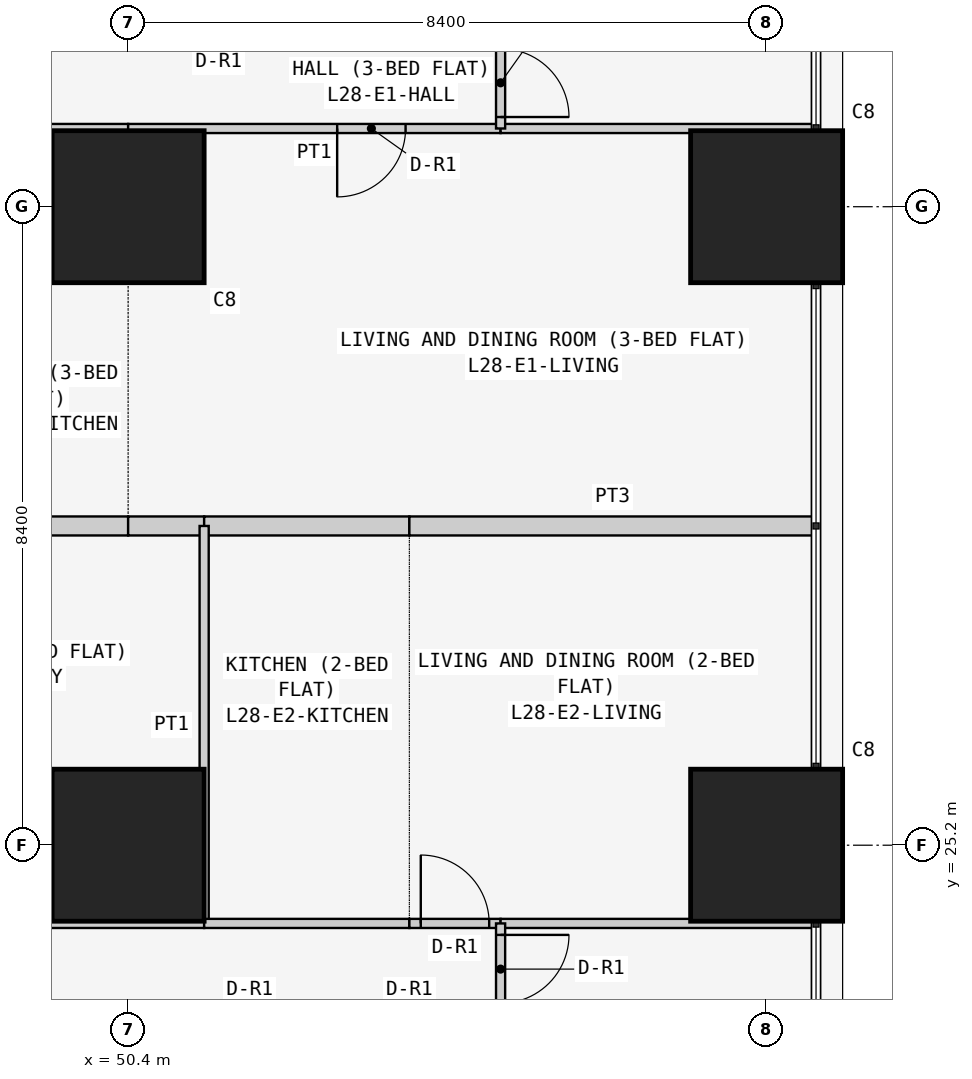
"""IFC4 building model, lengths in metres.
Left out: names, types, materials, properties, quantities, classifications, styles, units other than length and angle.
Written with IfcOpenShell. Run it as: python <this file> out.ifc"""

import sys

from ifc_helpers import new_model, si_unit, direction, frame, frame_2d, origin, origin_2d, place, context, subcontext, project, spatial, rectangle, extrude, element, fill, save


model = new_model("IFC4")
c1 = context("Model", 3, precision=1e-05, world=origin(), true_north=direction((0.0, 1.0)))
c2 = subcontext(c1, "Body", "Model", "MODEL_VIEW")
j1 = project(units=[si_unit("LENGTHUNIT", "METRE"), si_unit("PLANEANGLEUNIT", "RADIAN")], contexts=[c1])
p1 = place(None, origin())
s1 = spatial("IfcSite", under=j1, at=p1, CompositionType="ELEMENT")
p2 = place(p1, origin())
s2 = spatial("IfcBuilding", under=s1, at=p2, CompositionType="ELEMENT")
p3 = place(p2, frame((0.0, 0.0, 112.5)))
s3 = spatial("IfcBuildingStorey", under=s2, at=p3, CompositionType="ELEMENT", Elevation=112.5)
for number, where, z_axis, x_axis in (
    (1, (50.4, 25.2, 0.0), (0.0, 0.0, 1.0), (1.0, 0.0, 0.0)),
    (2, (50.4, 33.6, 0.0), (0.0, 0.0, 1.0), (1.0, 0.0, 0.0)),
    (3, (58.8, 25.2, 0.0), (0.0, 0.0, 1.0), (1.0, 0.0, 0.0)),
    (4, (58.8, 33.6, 0.0), (0.0, 0.0, 1.0), (1.0, 0.0, 0.0)),
):
    element("IfcColumn", number, at=place(p3, frame(where, z_axis=z_axis, x_axis=x_axis)), inside=s3, PredefinedType="COLUMN", context=c2, shape_type="SweptSolid", body=[
        extrude(rectangle(XDim=2.0, YDim=2.0, at=origin_2d()), origin(), (0.0, 0.0, 1.0), 3.6),
    ])
p4 = place(p3, frame((50.4, 34.629, 0.0), z_axis=(0.0, 0.0, 1.0), x_axis=(-1.0, 0.0, 0.0)))
e5 = element("IfcWall", 5, at=p4, inside=s3, PredefinedType="PARTITIONING", context=c2, shape_type="SweptSolid", body=[
    extrude(rectangle(XDim=2.4, YDim=0.12, at=frame_2d((1.2, 0.0))), origin(), (0.0, 0.0, 1.0), 3.45),
])
p5 = place(p3, frame((48.0, 29.4, 0.0), z_axis=(0.0, 0.0, 1.0), x_axis=(1.0, 0.0, 0.0)))
e6 = element("IfcWall", 6, at=p5, inside=s3, PredefinedType="PARTITIONING", context=c2, shape_type="SweptSolid", body=[
    extrude(rectangle(XDim=2.4, YDim=0.25, at=frame_2d((1.2, 0.0))), origin(), (0.0, 0.0, 1.0), 3.45),
])
p6 = place(p3, frame((55.3, 34.629, 0.0), z_axis=(0.0, 0.0, 1.0), x_axis=(-1.0, 0.0, 0.0)))
e7 = element("IfcWall", 7, at=p6, inside=s3, PredefinedType="PARTITIONING", context=c2, shape_type="SweptSolid", body=[
    extrude(rectangle(XDim=4.9, YDim=0.12, at=frame_2d((2.45, 0.0))), origin(), (0.0, 0.0, 1.0), 3.45),
])
p7 = place(p6, frame((1.25, 0.0, 0.0)))
e8 = element("IfcOpeningElement", 8, at=p7, cuts=e7, PredefinedType="OPENING", context=c2, shape_type="SweptSolid", body=[
    extrude(rectangle(XDim=0.9, YDim=2.1, at=frame_2d((0.45, 1.05))), frame((0.0, 0.07, 0.0), z_axis=(0.0, -1.0, 0.0), x_axis=(1.0, 0.0, 0.0)), (0.0, 0.0, 1.0), 0.14),
])
p8 = place(p3, frame((59.45, 34.629, 0.0), z_axis=(0.0, 0.0, 1.0), x_axis=(-1.0, 0.0, 0.0)))
e9 = element("IfcWall", 9, at=p8, inside=s3, PredefinedType="PARTITIONING", context=c2, shape_type="SweptSolid", body=[
    extrude(rectangle(XDim=4.15, YDim=0.12, at=frame_2d((2.075, 0.0))), origin(), (0.0, 0.0, 1.0), 3.45),
])
p9 = place(p3, frame((50.4, 29.4, 0.0), z_axis=(0.0, 0.0, 1.0), x_axis=(1.0, 0.0, 0.0)))
e10 = element("IfcWall", 10, at=p9, inside=s3, PredefinedType="PARTITIONING", context=c2, shape_type="SweptSolid", body=[
    extrude(rectangle(XDim=1.0, YDim=0.25, at=frame_2d((0.5, 0.0))), origin(), (0.0, 0.0, 1.0), 3.45),
])
p10 = place(p3, frame((51.4, 29.4, 0.0), z_axis=(0.0, 0.0, 1.0), x_axis=(1.0, 0.0, 0.0)))
e11 = element("IfcWall", 11, at=p10, inside=s3, PredefinedType="PARTITIONING", context=c2, shape_type="SweptSolid", body=[
    extrude(rectangle(XDim=2.7, YDim=0.25, at=frame_2d((1.35, 0.0))), origin(), (0.0, 0.0, 1.0), 3.45),
])
p11 = place(p3, frame((54.1, 29.4, 0.0), z_axis=(0.0, 0.0, 1.0), x_axis=(1.0, 0.0, 0.0)))
e12 = element("IfcWall", 12, at=p11, inside=s3, PredefinedType="PARTITIONING", context=c2, shape_type="SweptSolid", body=[
    extrude(rectangle(XDim=5.35, YDim=0.25, at=frame_2d((2.675, 0.0))), origin(), (0.0, 0.0, 1.0), 3.45),
])
p12 = place(p3, frame((55.3, 34.629, 0.0), z_axis=(0.0, 0.0, 1.0), x_axis=(0.0, 1.0, 0.0)))
e13 = element("IfcWall", 13, at=p12, inside=s3, PredefinedType="PARTITIONING", context=c2, shape_type="SweptSolid", body=[
    extrude(rectangle(XDim=1.2, YDim=0.12, at=frame_2d((0.6, 0.0))), origin(), (0.0, 0.0, 1.0), 3.45),
])
p13 = place(p12, frame((0.151, 0.0, 0.0)))
e14 = element("IfcOpeningElement", 14, at=p13, cuts=e13, PredefinedType="OPENING", context=c2, shape_type="SweptSolid", body=[
    extrude(rectangle(XDim=0.9, YDim=2.1, at=frame_2d((0.45, 1.05))), frame((0.0, 0.07, 0.0), z_axis=(0.0, -1.0, 0.0), x_axis=(1.0, 0.0, 0.0)), (0.0, 0.0, 1.0), 0.14),
])
p14 = place(p3, frame((51.4, 29.4, 0.0), z_axis=(0.0, 0.0, 1.0), x_axis=(0.0, -1.0, 0.0)))
e15 = element("IfcWall", 15, at=p14, inside=s3, PredefinedType="PARTITIONING", context=c2, shape_type="SweptSolid", body=[
    extrude(rectangle(XDim=5.229, YDim=0.12, at=frame_2d((2.615, 0.0))), origin(), (0.0, 0.0, 1.0), 3.45),
])
p15 = place(p3, frame((51.4, 24.171, 0.0), z_axis=(0.0, 0.0, 1.0), x_axis=(-1.0, 0.0, 0.0)))
e16 = element("IfcWall", 16, at=p15, inside=s3, PredefinedType="PARTITIONING", context=c2, shape_type="SweptSolid", body=[
    extrude(rectangle(XDim=4.8, YDim=0.12, at=frame_2d((2.4, 0.0))), origin(), (0.0, 0.0, 1.0), 3.45),
])
p16 = place(p15, frame((2.85, 0.0, 0.0)))
e17 = element("IfcOpeningElement", 17, at=p16, cuts=e16, PredefinedType="OPENING", context=c2, shape_type="SweptSolid", body=[
    extrude(rectangle(XDim=0.9, YDim=2.1, at=frame_2d((0.45, 1.05))), frame((0.0, 0.07, 0.0), z_axis=(0.0, -1.0, 0.0), x_axis=(1.0, 0.0, 0.0)), (0.0, 0.0, 1.0), 0.14),
])
p17 = place(p3, frame((54.1, 24.171, 0.0), z_axis=(0.0, 0.0, 1.0), x_axis=(-1.0, 0.0, 0.0)))
e18 = element("IfcWall", 18, at=p17, inside=s3, PredefinedType="PARTITIONING", context=c2, shape_type="SweptSolid", body=[
    extrude(rectangle(XDim=2.7, YDim=0.12, at=frame_2d((1.35, 0.0))), origin(), (0.0, 0.0, 1.0), 3.45),
])
p18 = place(p3, frame((55.3, 24.171, 0.0), z_axis=(0.0, 0.0, 1.0), x_axis=(-1.0, 0.0, 0.0)))
e19 = element("IfcWall", 19, at=p18, inside=s3, PredefinedType="PARTITIONING", context=c2, shape_type="SweptSolid", body=[
    extrude(rectangle(XDim=1.2, YDim=0.12, at=frame_2d((0.6, 0.0))), origin(), (0.0, 0.0, 1.0), 3.45),
])
p19 = place(p18, frame((0.15, 0.0, 0.0)))
e20 = element("IfcOpeningElement", 20, at=p19, cuts=e19, PredefinedType="OPENING", context=c2, shape_type="SweptSolid", body=[
    extrude(rectangle(XDim=0.9, YDim=2.1, at=frame_2d((0.45, 1.05))), frame((0.0, 0.07, 0.0), z_axis=(0.0, -1.0, 0.0), x_axis=(1.0, 0.0, 0.0)), (0.0, 0.0, 1.0), 0.14),
])
p20 = place(p3, frame((59.45, 24.171, 0.0), z_axis=(0.0, 0.0, 1.0), x_axis=(-1.0, 0.0, 0.0)))
e21 = element("IfcWall", 21, at=p20, inside=s3, PredefinedType="PARTITIONING", context=c2, shape_type="SweptSolid", body=[
    extrude(rectangle(XDim=4.15, YDim=0.12, at=frame_2d((2.075, 0.0))), origin(), (0.0, 0.0, 1.0), 3.45),
])
p21 = place(p3, frame((55.3, 24.171, 0.0), z_axis=(0.0, 0.0, 1.0), x_axis=(0.0, -1.0, 0.0)))
e22 = element("IfcWall", 22, at=p21, inside=s3, PredefinedType="PARTITIONING", context=c2, shape_type="SweptSolid", body=[
    extrude(rectangle(XDim=1.2, YDim=0.12, at=frame_2d((0.6, 0.0))), origin(), (0.0, 0.0, 1.0), 3.45),
])
p22 = place(p21, frame((0.151, 0.0, 0.0)))
e23 = element("IfcOpeningElement", 23, at=p22, cuts=e22, PredefinedType="OPENING", context=c2, shape_type="SweptSolid", body=[
    extrude(rectangle(XDim=0.9, YDim=2.1, at=frame_2d((0.45, 1.05))), frame((0.0, 0.07, 0.0), z_axis=(0.0, -1.0, 0.0), x_axis=(1.0, 0.0, 0.0)), (0.0, 0.0, 1.0), 0.14),
])
p23 = place(p7, origin())
e24 = element("IfcDoor", 24, at=p23, inside=s3, OperationType="SINGLE_SWING_RIGHT", PredefinedType="DOOR", context=c2, shape_type="SweptSolid", body=[
    extrude(rectangle(XDim=0.9, YDim=2.1, at=frame_2d((0.45, 1.05))), frame((0.0, 0.025, 0.0), z_axis=(0.0, -1.0, 0.0), x_axis=(1.0, 0.0, 0.0)), (0.0, 0.0, 1.0), 0.05),
])
fill(e8, e24)
p24 = place(p13, frame((0.9, 0.0, 0.0), z_axis=(0.0, 0.0, 1.0), x_axis=(-1.0, 0.0, 0.0)))
e25 = element("IfcDoor", 25, at=p24, inside=s3, OperationType="SINGLE_SWING_RIGHT", PredefinedType="DOOR", context=c2, shape_type="SweptSolid", body=[
    extrude(rectangle(XDim=0.9, YDim=2.1, at=frame_2d((0.45, 1.05))), frame((0.0, 0.025, 0.0), z_axis=(0.0, -1.0, 0.0), x_axis=(1.0, 0.0, 0.0)), (0.0, 0.0, 1.0), 0.05),
])
fill(e14, e25)
p25 = place(p19, frame((0.9, 0.0, 0.0), z_axis=(0.0, 0.0, 1.0), x_axis=(-1.0, 0.0, 0.0)))
e26 = element("IfcDoor", 26, at=p25, inside=s3, OperationType="SINGLE_SWING_LEFT", PredefinedType="DOOR", context=c2, shape_type="SweptSolid", body=[
    extrude(rectangle(XDim=0.9, YDim=2.1, at=frame_2d((0.45, 1.05))), frame((0.0, 0.025, 0.0), z_axis=(0.0, -1.0, 0.0), x_axis=(1.0, 0.0, 0.0)), (0.0, 0.0, 1.0), 0.05),
])
fill(e20, e26)
p26 = place(p22, origin())
e27 = element("IfcDoor", 27, at=p26, inside=s3, OperationType="SINGLE_SWING_LEFT", PredefinedType="DOOR", context=c2, shape_type="SweptSolid", body=[
    extrude(rectangle(XDim=0.9, YDim=2.1, at=frame_2d((0.45, 1.05))), frame((0.0, 0.025, 0.0), z_axis=(0.0, -1.0, 0.0), x_axis=(1.0, 0.0, 0.0)), (0.0, 0.0, 1.0), 0.05),
])
fill(e23, e27)
save(model, sys.argv[1])
